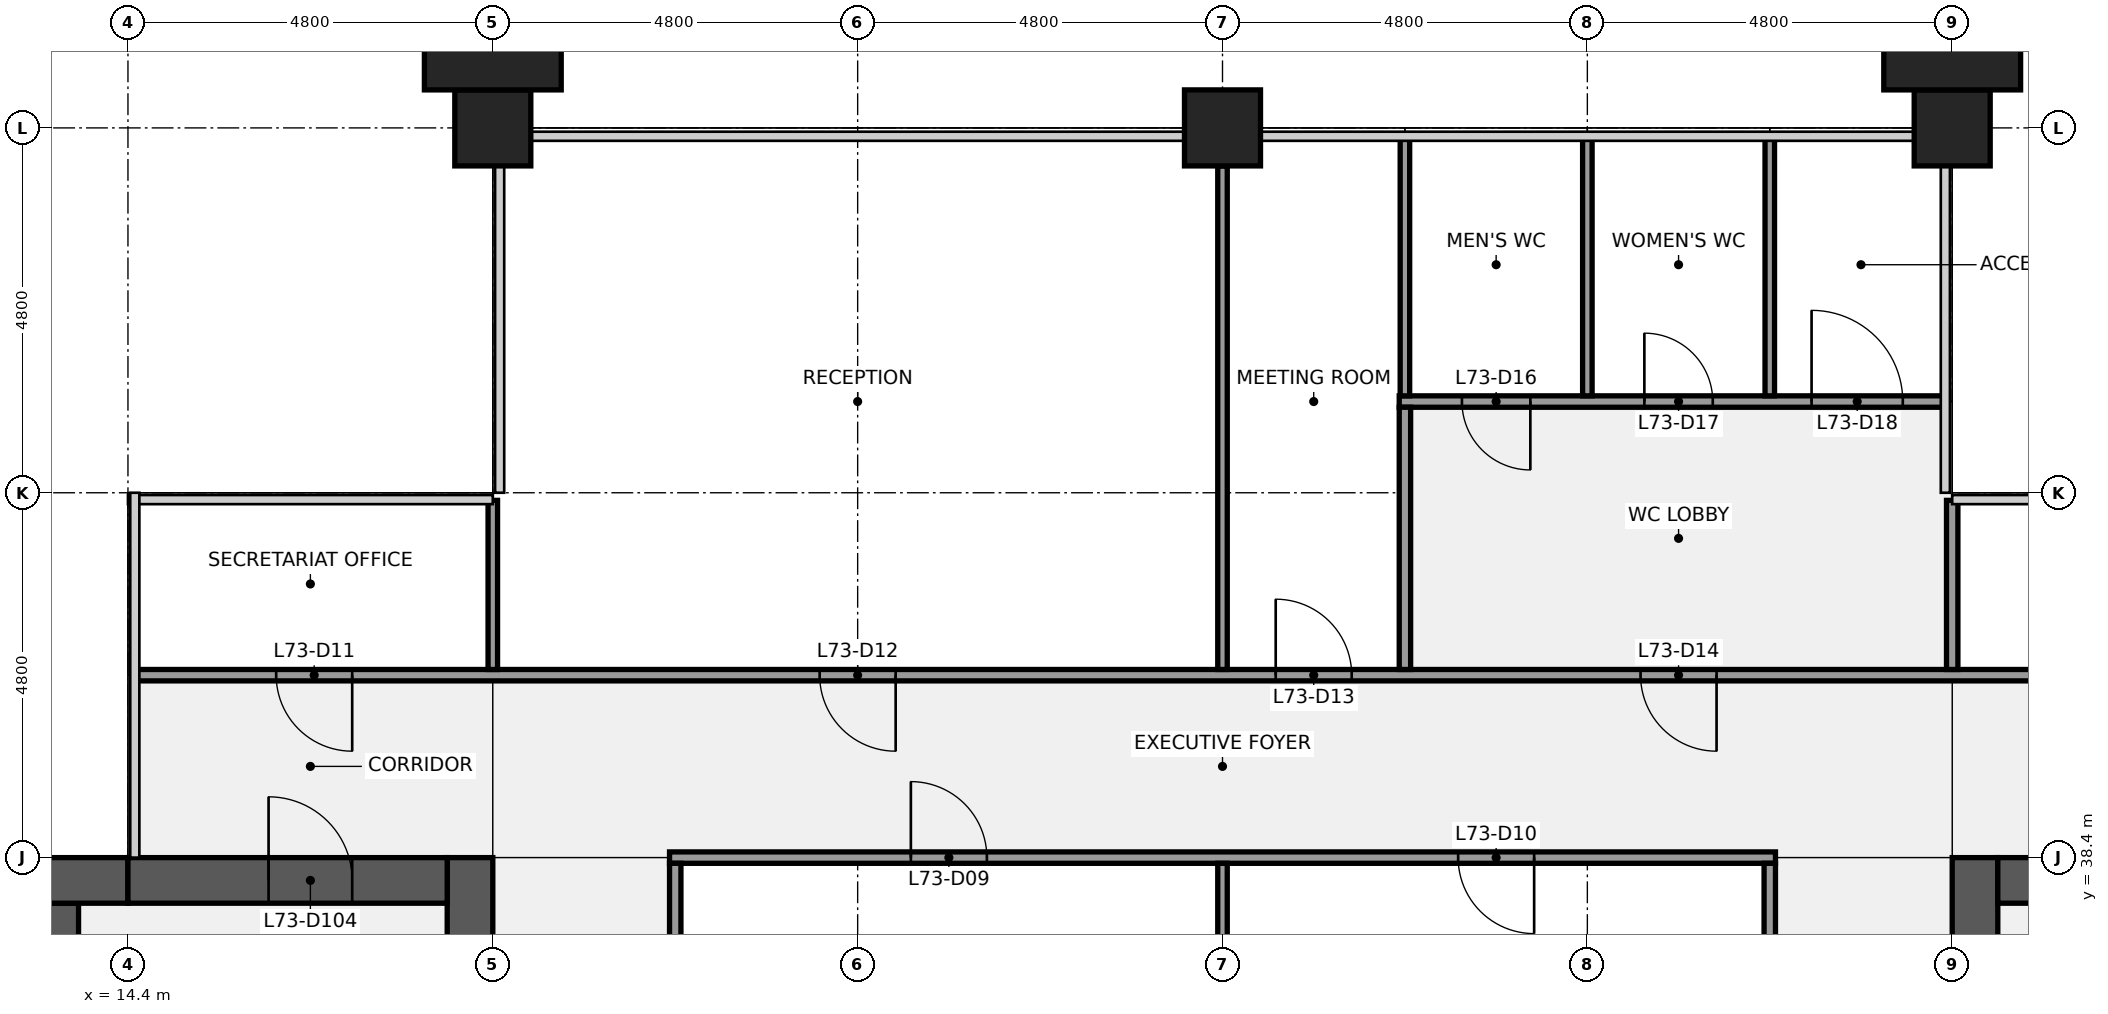
"""IFC4 building model, lengths in metres.
Left out: names, types, materials, properties, quantities, classifications, styles, units other than length and angle.
Written with IfcOpenShell. Run it as: python <this file> out.ifc"""

import sys

from ifc_helpers import new_model, si_unit, direction, frame, frame_2d, origin, origin_2d, place, context, subcontext, project, spatial, rectangle, extrude, element, fill, save


model = new_model("IFC4")
c1 = context("Model", 3, precision=1e-05, world=origin(), true_north=direction((0.0, 1.0)))
c2 = subcontext(c1, "Body", "Model", "MODEL_VIEW")
j1 = project(units=[si_unit("LENGTHUNIT", "METRE"), si_unit("PLANEANGLEUNIT", "RADIAN")], contexts=[c1])
p1 = place(None, origin())
s1 = spatial("IfcSite", under=j1, at=p1, CompositionType="ELEMENT")
p2 = place(p1, origin())
s2 = spatial("IfcBuilding", under=s1, at=p2, CompositionType="ELEMENT")
p3 = place(p2, frame((0.0, 0.0, 330.3)))
s3 = spatial("IfcBuildingStorey", under=s2, at=p3, CompositionType="ELEMENT", Elevation=330.3)
for number, where, z_axis, x_axis in (
    (1, (19.2, 48.0, 0.0), (0.0, 0.0, 1.0), (1.0, 0.0, 0.0)),
    (2, (28.8, 48.0, 0.0), (0.0, 0.0, 1.0), (1.0, 0.0, 0.0)),
    (3, (38.4, 48.0, 0.0), (0.0, 0.0, 1.0), (1.0, 0.0, 0.0)),
):
    element("IfcColumn", number, at=place(p3, frame(where, z_axis=z_axis, x_axis=x_axis)), inside=s3, PredefinedType="COLUMN", context=c2, shape_type="SweptSolid", body=[
        extrude(rectangle(XDim=1.0, YDim=1.0, at=origin_2d()), origin(), (0.0, 0.0, 1.0), 4.0),
    ])
p4 = place(p3, frame((18.9, 38.4, 0.0), z_axis=(0.0, 0.0, 1.0), x_axis=(0.0, -1.0, 0.0)))
e4 = element("IfcWall", 4, at=p4, inside=s3, PredefinedType="SHEAR", context=c2, shape_type="SweptSolid", body=[
    extrude(rectangle(XDim=28.8, YDim=0.6, at=frame_2d((14.4, 0.0))), origin(), (0.0, 0.0, 1.0), 3.84),
])
p5 = place(p4, frame((18.3, 0.0, 0.0)))
e5 = element("IfcOpeningElement", 5, at=p5, cuts=e4, PredefinedType="OPENING", context=c2, shape_type="SweptSolid", body=[
    extrude(rectangle(XDim=1.8, YDim=2.1, at=frame_2d((0.9, 1.05))), frame((0.0, 0.31, 0.0), z_axis=(0.0, -1.0, 0.0), x_axis=(1.0, 0.0, 0.0)), (0.0, 0.0, 1.0), 0.62),
])
p6 = place(p4, frame((8.7, 0.0, 0.0)))
e6 = element("IfcOpeningElement", 6, at=p6, cuts=e4, PredefinedType="OPENING", context=c2, shape_type="SweptSolid", body=[
    extrude(rectangle(XDim=1.8, YDim=2.1, at=frame_2d((0.9, 1.05))), frame((0.0, 0.31, 0.0), z_axis=(0.0, -1.0, 0.0), x_axis=(1.0, 0.0, 0.0)), (0.0, 0.0, 1.0), 0.62),
])
p7 = place(p3, frame((6.25, 37.5, 0.0), z_axis=(0.0, 0.0, 1.0), x_axis=(1.0, 0.0, 0.0)))
e7 = element("IfcWall", 7, at=p7, inside=s3, PredefinedType="SHEAR", context=c2, shape_type="SweptSolid", body=[
    extrude(rectangle(XDim=7.5, YDim=0.6, at=frame_2d((3.75, 0.0))), origin(), (0.0, 0.0, 1.0), 3.84),
])
p8 = place(p3, frame((0.6, 38.1, 0.0), z_axis=(0.0, 0.0, 1.0), x_axis=(1.0, 0.0, 0.0)))
e8 = element("IfcWall", 8, at=p8, inside=s3, PredefinedType="SHEAR", context=c2, shape_type="SweptSolid", body=[
    extrude(rectangle(XDim=13.8, YDim=0.6, at=frame_2d((6.9, 0.0))), origin(), (0.0, 0.0, 1.0), 3.84),
])
p9 = place(p8, frame((5.7, 0.0, 0.9)))
e9 = element("IfcOpeningElement", 9, at=p9, cuts=e8, PredefinedType="OPENING", context=c2, shape_type="SweptSolid", body=[
    extrude(rectangle(XDim=1.8, YDim=1.5, at=frame_2d((0.9, 0.75))), frame((0.0, 0.31, 0.0), z_axis=(0.0, -1.0, 0.0), x_axis=(1.0, 0.0, 0.0)), (0.0, 0.0, 1.0), 0.62),
])
p10 = place(p8, frame((10.5, 0.0, 0.9)))
e10 = element("IfcOpeningElement", 10, at=p10, cuts=e8, PredefinedType="OPENING", context=c2, shape_type="SweptSolid", body=[
    extrude(rectangle(XDim=1.8, YDim=1.5, at=frame_2d((0.9, 0.75))), frame((0.0, 0.31, 0.0), z_axis=(0.0, -1.0, 0.0), x_axis=(1.0, 0.0, 0.0)), (0.0, 0.0, 1.0), 0.62),
])
p11 = place(p3, frame((14.4, 38.1, 0.0), z_axis=(0.0, 0.0, 1.0), x_axis=(1.0, 0.0, 0.0)))
e11 = element("IfcWall", 11, at=p11, inside=s3, PredefinedType="SHEAR", context=c2, shape_type="SweptSolid", body=[
    extrude(rectangle(XDim=4.2, YDim=0.6, at=frame_2d((2.1, 0.0))), origin(), (0.0, 0.0, 1.0), 3.84),
])
p12 = place(p11, frame((1.85, 0.0, 0.0)))
e12 = element("IfcOpeningElement", 12, at=p12, cuts=e11, PredefinedType="OPENING", context=c2, shape_type="SweptSolid", body=[
    extrude(rectangle(XDim=1.1, YDim=2.1, at=frame_2d((0.55, 1.05))), frame((0.0, 0.31, 0.0), z_axis=(0.0, -1.0, 0.0), x_axis=(1.0, 0.0, 0.0)), (0.0, 0.0, 1.0), 0.62),
])
p13 = place(p3, frame((38.7, 9.6, 0.0), z_axis=(0.0, 0.0, 1.0), x_axis=(0.0, 1.0, 0.0)))
e13 = element("IfcWall", 13, at=p13, inside=s3, PredefinedType="SHEAR", context=c2, shape_type="SweptSolid", body=[
    extrude(rectangle(XDim=28.8, YDim=0.6, at=frame_2d((14.4, 0.0))), origin(), (0.0, 0.0, 1.0), 3.84),
])
p14 = place(p13, frame((8.7, 0.0, 0.0)))
e14 = element("IfcOpeningElement", 14, at=p14, cuts=e13, PredefinedType="OPENING", context=c2, shape_type="SweptSolid", body=[
    extrude(rectangle(XDim=1.8, YDim=2.1, at=frame_2d((0.9, 1.05))), frame((0.0, 0.31, 0.0), z_axis=(0.0, -1.0, 0.0), x_axis=(1.0, 0.0, 0.0)), (0.0, 0.0, 1.0), 0.62),
])
p15 = place(p13, frame((18.3, 0.0, 0.0)))
e15 = element("IfcOpeningElement", 15, at=p15, cuts=e13, PredefinedType="OPENING", context=c2, shape_type="SweptSolid", body=[
    extrude(rectangle(XDim=1.8, YDim=2.1, at=frame_2d((0.9, 1.05))), frame((0.0, 0.31, 0.0), z_axis=(0.0, -1.0, 0.0), x_axis=(1.0, 0.0, 0.0)), (0.0, 0.0, 1.0), 0.62),
])
p16 = place(p3, frame((39.0, 38.1, 0.0), z_axis=(0.0, 0.0, 1.0), x_axis=(1.0, 0.0, 0.0)))
e16 = element("IfcWall", 16, at=p16, inside=s3, PredefinedType="SHEAR", context=c2, shape_type="SweptSolid", body=[
    extrude(rectangle(XDim=4.2, YDim=0.6, at=frame_2d((2.1, 0.0))), origin(), (0.0, 0.0, 1.0), 3.84),
])
p17 = place(p16, frame((1.25, 0.0, 0.0)))
e17 = element("IfcOpeningElement", 17, at=p17, cuts=e16, PredefinedType="OPENING", context=c2, shape_type="SweptSolid", body=[
    extrude(rectangle(XDim=1.1, YDim=2.1, at=frame_2d((0.55, 1.05))), frame((0.0, 0.31, 0.0), z_axis=(0.0, -1.0, 0.0), x_axis=(1.0, 0.0, 0.0)), (0.0, 0.0, 1.0), 0.62),
])
p18 = place(p3, frame((21.525, 38.4, 0.0), z_axis=(0.0, 0.0, 1.0), x_axis=(1.0, 0.0, 0.0)))
e18 = element("IfcWall", 18, at=p18, inside=s3, PredefinedType="PARTITIONING", context=c2, shape_type="SweptSolid", body=[
    extrude(rectangle(XDim=14.55, YDim=0.15, at=frame_2d((7.275, 0.0))), origin(), (0.0, 0.0, 1.0), 2.87),
])
p19 = place(p18, frame((3.175, 0.0, 0.0)))
e19 = element("IfcOpeningElement", 19, at=p19, cuts=e18, PredefinedType="OPENING", context=c2, shape_type="SweptSolid", body=[
    extrude(rectangle(XDim=1.0, YDim=2.1, at=frame_2d((0.5, 1.05))), frame((0.0, 0.085, 0.0), z_axis=(0.0, -1.0, 0.0), x_axis=(1.0, 0.0, 0.0)), (0.0, 0.0, 1.0), 0.17),
])
p20 = place(p18, frame((10.375, 0.0, 0.0)))
e20 = element("IfcOpeningElement", 20, at=p20, cuts=e18, PredefinedType="OPENING", context=c2, shape_type="SweptSolid", body=[
    extrude(rectangle(XDim=1.0, YDim=2.1, at=frame_2d((0.5, 1.05))), frame((0.0, 0.085, 0.0), z_axis=(0.0, -1.0, 0.0), x_axis=(1.0, 0.0, 0.0)), (0.0, 0.0, 1.0), 0.17),
])
p21 = place(p3, frame((14.5, 40.8, 0.0), z_axis=(0.0, 0.0, 1.0), x_axis=(1.0, 0.0, 0.0)))
e21 = element("IfcWall", 21, at=p21, inside=s3, PredefinedType="PARTITIONING", context=c2, shape_type="SweptSolid", body=[
    extrude(rectangle(XDim=28.6, YDim=0.15, at=frame_2d((14.3, 0.0))), origin(), (0.0, 0.0, 1.0), 2.87),
])
p22 = place(p21, frame((1.85, 0.0, 0.0)))
e22 = element("IfcOpeningElement", 22, at=p22, cuts=e21, PredefinedType="OPENING", context=c2, shape_type="SweptSolid", body=[
    extrude(rectangle(XDim=1.0, YDim=2.1, at=frame_2d((0.5, 1.05))), frame((0.0, 0.085, 0.0), z_axis=(0.0, -1.0, 0.0), x_axis=(1.0, 0.0, 0.0)), (0.0, 0.0, 1.0), 0.17),
])
p23 = place(p21, frame((9.0, 0.0, 0.0)))
e23 = element("IfcOpeningElement", 23, at=p23, cuts=e21, PredefinedType="OPENING", context=c2, shape_type="SweptSolid", body=[
    extrude(rectangle(XDim=1.0, YDim=2.1, at=frame_2d((0.5, 1.05))), frame((0.0, 0.085, 0.0), z_axis=(0.0, -1.0, 0.0), x_axis=(1.0, 0.0, 0.0)), (0.0, 0.0, 1.0), 0.17),
])
p24 = place(p21, frame((15.0, 0.0, 0.0)))
e24 = element("IfcOpeningElement", 24, at=p24, cuts=e21, PredefinedType="OPENING", context=c2, shape_type="SweptSolid", body=[
    extrude(rectangle(XDim=1.0, YDim=2.1, at=frame_2d((0.5, 1.05))), frame((0.0, 0.085, 0.0), z_axis=(0.0, -1.0, 0.0), x_axis=(1.0, 0.0, 0.0)), (0.0, 0.0, 1.0), 0.17),
])
p25 = place(p21, frame((19.8, 0.0, 0.0)))
e25 = element("IfcOpeningElement", 25, at=p25, cuts=e21, PredefinedType="OPENING", context=c2, shape_type="SweptSolid", body=[
    extrude(rectangle(XDim=1.0, YDim=2.1, at=frame_2d((0.5, 1.05))), frame((0.0, 0.085, 0.0), z_axis=(0.0, -1.0, 0.0), x_axis=(1.0, 0.0, 0.0)), (0.0, 0.0, 1.0), 0.17),
])
p26 = place(p21, frame((25.75, 0.0, 0.0)))
e26 = element("IfcOpeningElement", 26, at=p26, cuts=e21, PredefinedType="OPENING", context=c2, shape_type="SweptSolid", body=[
    extrude(rectangle(XDim=1.0, YDim=2.1, at=frame_2d((0.5, 1.05))), frame((0.0, 0.085, 0.0), z_axis=(0.0, -1.0, 0.0), x_axis=(1.0, 0.0, 0.0)), (0.0, 0.0, 1.0), 0.17),
])
p27 = place(p3, frame((31.125, 44.4, 0.0), z_axis=(0.0, 0.0, 1.0), x_axis=(1.0, 0.0, 0.0)))
e27 = element("IfcWall", 27, at=p27, inside=s3, PredefinedType="PARTITIONING", context=c2, shape_type="SweptSolid", body=[
    extrude(rectangle(XDim=7.175, YDim=0.15, at=frame_2d((3.587, 0.0))), origin(), (0.0, 0.0, 1.0), 2.87),
])
p28 = place(p27, frame((0.825, 0.0, 0.0)))
e28 = element("IfcOpeningElement", 28, at=p28, cuts=e27, PredefinedType="OPENING", context=c2, shape_type="SweptSolid", body=[
    extrude(rectangle(XDim=0.9, YDim=2.1, at=frame_2d((0.45, 1.05))), frame((0.0, 0.085, 0.0), z_axis=(0.0, -1.0, 0.0), x_axis=(1.0, 0.0, 0.0)), (0.0, 0.0, 1.0), 0.17),
])
p29 = place(p27, frame((3.225, 0.0, 0.0)))
e29 = element("IfcOpeningElement", 29, at=p29, cuts=e27, PredefinedType="OPENING", context=c2, shape_type="SweptSolid", body=[
    extrude(rectangle(XDim=0.9, YDim=2.1, at=frame_2d((0.45, 1.05))), frame((0.0, 0.085, 0.0), z_axis=(0.0, -1.0, 0.0), x_axis=(1.0, 0.0, 0.0)), (0.0, 0.0, 1.0), 0.17),
])
p30 = place(p27, frame((5.425, 0.0, 0.0)))
e30 = element("IfcOpeningElement", 30, at=p30, cuts=e27, PredefinedType="OPENING", context=c2, shape_type="SweptSolid", body=[
    extrude(rectangle(XDim=1.2, YDim=2.1, at=frame_2d((0.6, 1.05))), frame((0.0, 0.085, 0.0), z_axis=(0.0, -1.0, 0.0), x_axis=(1.0, 0.0, 0.0)), (0.0, 0.0, 1.0), 0.17),
])
p31 = place(p3, frame((19.2, 40.875, 0.0), z_axis=(0.0, 0.0, 1.0), x_axis=(0.0, 1.0, 0.0)))
e31 = element("IfcWall", 31, at=p31, inside=s3, PredefinedType="PARTITIONING", context=c2, shape_type="SweptSolid", body=[
    extrude(rectangle(XDim=2.225, YDim=0.125, at=frame_2d((1.113, 0.0))), origin(), (0.0, 0.0, 1.0), 2.87),
])
p32 = place(p3, frame((21.6, 33.675, 0.0), z_axis=(0.0, 0.0, 1.0), x_axis=(0.0, 1.0, 0.0)))
e32 = element("IfcWall", 32, at=p32, inside=s3, PredefinedType="PARTITIONING", context=c2, shape_type="SweptSolid", body=[
    extrude(rectangle(XDim=4.65, YDim=0.15, at=frame_2d((2.325, 0.0))), origin(), (0.0, 0.0, 1.0), 2.87),
])
p33 = place(p3, frame((28.8, 33.663, 0.0), z_axis=(0.0, 0.0, 1.0), x_axis=(0.0, 1.0, 0.0)))
e33 = element("IfcWall", 33, at=p33, inside=s3, PredefinedType="PARTITIONING", context=c2, shape_type="SweptSolid", body=[
    extrude(rectangle(XDim=4.662, YDim=0.125, at=frame_2d((2.331, 0.0))), origin(), (0.0, 0.0, 1.0), 2.87),
])
p34 = place(p3, frame((28.8, 40.875, 0.0), z_axis=(0.0, 0.0, 1.0), x_axis=(0.0, 1.0, 0.0)))
e34 = element("IfcWall", 34, at=p34, inside=s3, PredefinedType="PARTITIONING", context=c2, shape_type="SweptSolid", body=[
    extrude(rectangle(XDim=6.625, YDim=0.125, at=frame_2d((3.312, 0.0))), origin(), (0.0, 0.0, 1.0), 2.87),
])
p35 = place(p3, frame((31.2, 44.475, 0.0), z_axis=(0.0, 0.0, 1.0), x_axis=(0.0, 1.0, 0.0)))
e35 = element("IfcWall", 35, at=p35, inside=s3, PredefinedType="PARTITIONING", context=c2, shape_type="SweptSolid", body=[
    extrude(rectangle(XDim=3.425, YDim=0.125, at=frame_2d((1.712, 0.0))), origin(), (0.0, 0.0, 1.0), 2.87),
])
p36 = place(p3, frame((31.2, 40.875, 0.0), z_axis=(0.0, 0.0, 1.0), x_axis=(0.0, 1.0, 0.0)))
e36 = element("IfcWall", 36, at=p36, inside=s3, PredefinedType="PARTITIONING", context=c2, shape_type="SweptSolid", body=[
    extrude(rectangle(XDim=3.45, YDim=0.15, at=frame_2d((1.725, 0.0))), origin(), (0.0, 0.0, 1.0), 2.87),
])
for number, where, z_axis, x_axis in (
    (37, (33.6, 44.475, 0.0), (0.0, 0.0, 1.0), (0.0, 1.0, 0.0)),
    (38, (36.0, 44.475, 0.0), (0.0, 0.0, 1.0), (0.0, 1.0, 0.0)),
):
    element("IfcWall", number, at=place(p3, frame(where, z_axis=z_axis, x_axis=x_axis)), inside=s3, PredefinedType="PARTITIONING", context=c2, shape_type="SweptSolid", body=[
        extrude(rectangle(XDim=3.425, YDim=0.125, at=frame_2d((1.712, 0.0))), origin(), (0.0, 0.0, 1.0), 2.87),
    ])
p37 = place(p3, frame((36.0, 33.675, 0.0), z_axis=(0.0, 0.0, 1.0), x_axis=(0.0, 1.0, 0.0)))
e39 = element("IfcWall", 39, at=p37, inside=s3, PredefinedType="PARTITIONING", context=c2, shape_type="SweptSolid", body=[
    extrude(rectangle(XDim=4.65, YDim=0.15, at=frame_2d((2.325, 0.0))), origin(), (0.0, 0.0, 1.0), 2.87),
])
p38 = place(p3, frame((38.4, 40.875, 0.0), z_axis=(0.0, 0.0, 1.0), x_axis=(0.0, 1.0, 0.0)))
e40 = element("IfcWall", 40, at=p38, inside=s3, PredefinedType="PARTITIONING", context=c2, shape_type="SweptSolid", body=[
    extrude(rectangle(XDim=2.225, YDim=0.15, at=frame_2d((1.113, 0.0))), origin(), (0.0, 0.0, 1.0), 2.87),
])
for number, where, z_axis, x_axis in (
    (41, (19.2, 49.0, 0.0), (0.0, 0.0, 1.0), (1.0, 0.0, 0.0)),
    (42, (38.4, 49.0, 0.0), (0.0, 0.0, 1.0), (1.0, 0.0, 0.0)),
):
    element("IfcColumn", number, at=place(p3, frame(where, z_axis=z_axis, x_axis=x_axis)), inside=s3, PredefinedType="PILASTER", context=c2, shape_type="SweptSolid", body=[
        extrude(rectangle(XDim=1.8, YDim=1.0, at=origin_2d()), origin(), (0.0, 0.0, 1.0), 4.0),
    ])
p39 = place(p12, origin())
e43 = element("IfcDoor", 43, at=p39, inside=s3, OperationType="SINGLE_SWING_LEFT", PredefinedType="DOOR", context=c2, shape_type="SweptSolid", body=[
    extrude(rectangle(XDim=1.1, YDim=2.1, at=frame_2d((0.55, 1.05))), frame((0.0, 0.025, 0.0), z_axis=(0.0, -1.0, 0.0), x_axis=(1.0, 0.0, 0.0)), (0.0, 0.0, 1.0), 0.05),
])
fill(e12, e43)
p40 = place(p19, origin())
e44 = element("IfcDoor", 44, at=p40, inside=s3, OperationType="SINGLE_SWING_LEFT", PredefinedType="DOOR", context=c2, shape_type="SweptSolid", body=[
    extrude(rectangle(XDim=1.0, YDim=2.1, at=frame_2d((0.5, 1.05))), frame((0.0, 0.025, 0.0), z_axis=(0.0, -1.0, 0.0), x_axis=(1.0, 0.0, 0.0)), (0.0, 0.0, 1.0), 0.05),
])
fill(e19, e44)
p41 = place(p20, origin())
e45 = element("IfcDoor", 45, at=p41, inside=s3, OperationType="SINGLE_SWING_RIGHT", PredefinedType="DOOR", context=c2, shape_type="SweptSolid", body=[
    extrude(rectangle(XDim=1.0, YDim=2.1, at=frame_2d((0.5, 1.05))), frame((0.0, 0.025, 0.0), z_axis=(0.0, -1.0, 0.0), x_axis=(1.0, 0.0, 0.0)), (0.0, 0.0, 1.0), 0.05),
])
fill(e20, e45)
p42 = place(p22, origin())
e46 = element("IfcDoor", 46, at=p42, inside=s3, OperationType="SINGLE_SWING_RIGHT", PredefinedType="DOOR", context=c2, shape_type="SweptSolid", body=[
    extrude(rectangle(XDim=1.0, YDim=2.1, at=frame_2d((0.5, 1.05))), frame((0.0, 0.025, 0.0), z_axis=(0.0, -1.0, 0.0), x_axis=(1.0, 0.0, 0.0)), (0.0, 0.0, 1.0), 0.05),
])
fill(e22, e46)
p43 = place(p23, origin())
e47 = element("IfcDoor", 47, at=p43, inside=s3, OperationType="SINGLE_SWING_RIGHT", PredefinedType="DOOR", context=c2, shape_type="SweptSolid", body=[
    extrude(rectangle(XDim=1.0, YDim=2.1, at=frame_2d((0.5, 1.05))), frame((0.0, 0.025, 0.0), z_axis=(0.0, -1.0, 0.0), x_axis=(1.0, 0.0, 0.0)), (0.0, 0.0, 1.0), 0.05),
])
fill(e23, e47)
p44 = place(p24, origin())
e48 = element("IfcDoor", 48, at=p44, inside=s3, OperationType="SINGLE_SWING_LEFT", PredefinedType="DOOR", context=c2, shape_type="SweptSolid", body=[
    extrude(rectangle(XDim=1.0, YDim=2.1, at=frame_2d((0.5, 1.05))), frame((0.0, 0.025, 0.0), z_axis=(0.0, -1.0, 0.0), x_axis=(1.0, 0.0, 0.0)), (0.0, 0.0, 1.0), 0.05),
])
fill(e24, e48)
p45 = place(p25, origin())
e49 = element("IfcDoor", 49, at=p45, inside=s3, OperationType="SINGLE_SWING_RIGHT", PredefinedType="DOOR", context=c2, shape_type="SweptSolid", body=[
    extrude(rectangle(XDim=1.0, YDim=2.1, at=frame_2d((0.5, 1.05))), frame((0.0, 0.025, 0.0), z_axis=(0.0, -1.0, 0.0), x_axis=(1.0, 0.0, 0.0)), (0.0, 0.0, 1.0), 0.05),
])
fill(e25, e49)
p46 = place(p28, origin())
e50 = element("IfcDoor", 50, at=p46, inside=s3, OperationType="SINGLE_SWING_RIGHT", PredefinedType="DOOR", context=c2, shape_type="SweptSolid", body=[
    extrude(rectangle(XDim=0.9, YDim=2.1, at=frame_2d((0.45, 1.05))), frame((0.0, 0.025, 0.0), z_axis=(0.0, -1.0, 0.0), x_axis=(1.0, 0.0, 0.0)), (0.0, 0.0, 1.0), 0.05),
])
fill(e28, e50)
p47 = place(p29, origin())
e51 = element("IfcDoor", 51, at=p47, inside=s3, OperationType="SINGLE_SWING_LEFT", PredefinedType="DOOR", context=c2, shape_type="SweptSolid", body=[
    extrude(rectangle(XDim=0.9, YDim=2.1, at=frame_2d((0.45, 1.05))), frame((0.0, 0.025, 0.0), z_axis=(0.0, -1.0, 0.0), x_axis=(1.0, 0.0, 0.0)), (0.0, 0.0, 1.0), 0.05),
])
fill(e29, e51)
p48 = place(p30, origin())
e52 = element("IfcDoor", 52, at=p48, inside=s3, OperationType="SINGLE_SWING_LEFT", PredefinedType="DOOR", context=c2, shape_type="SweptSolid", body=[
    extrude(rectangle(XDim=1.2, YDim=2.1, at=frame_2d((0.6, 1.05))), frame((0.0, 0.025, 0.0), z_axis=(0.0, -1.0, 0.0), x_axis=(1.0, 0.0, 0.0)), (0.0, 0.0, 1.0), 0.05),
])
fill(e30, e52)
save(model, sys.argv[1])
